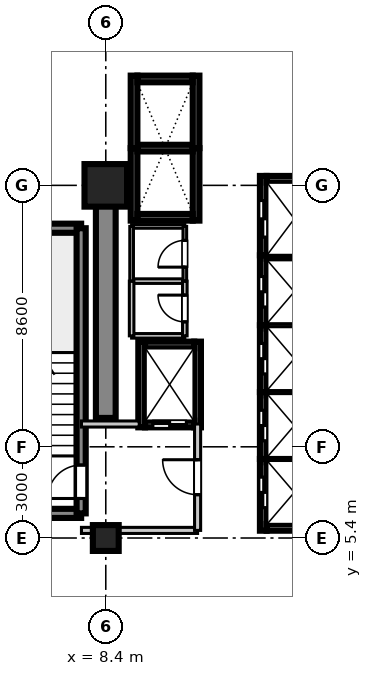
"""IFC4 building model, lengths in metres.
Left out: names, types, materials, properties, quantities, classifications, styles, units other than length and angle.
Written with IfcOpenShell. Run it as: python <this file> out.ifc"""

import sys

from ifc_helpers import new_model, si_unit, direction, frame, frame_2d, origin, origin_2d, place, context, subcontext, project, spatial, rectangle, extrude, source, transform, mapped, element, fill, save


model = new_model("IFC4")
c1 = context("Model", 3, precision=1e-05, world=origin(), true_north=direction((0.0, 1.0)))
c2 = subcontext(c1, "Body", "Model", "MODEL_VIEW")
j1 = project(units=[si_unit("LENGTHUNIT", "METRE"), si_unit("PLANEANGLEUNIT", "RADIAN")], contexts=[c1])
p1 = place(None, origin())
s1 = spatial("IfcSite", under=j1, at=p1, CompositionType="ELEMENT")
p2 = place(p1, origin())
s2 = spatial("IfcBuilding", under=s1, at=p2, CompositionType="ELEMENT")
p3 = place(p2, frame((0.0, 0.0, 61.6)))
s3 = spatial("IfcBuildingStorey", under=s2, at=p3, CompositionType="ELEMENT", Elevation=61.6)
m1 = source(origin(), c2, "Body", "SweptSolid", [
    extrude(rectangle(XDim=0.85, YDim=0.85, at=origin_2d()), origin(), (0.0, 0.0, 1.0), 3.605),
])
p4 = place(p3, frame((8.4, 5.4, 0.0), z_axis=(0.0, 0.0, 1.0), x_axis=(1.0, 0.0, 0.0)))
e1 = element("IfcColumn", 1, at=p4, inside=s3, PredefinedType="PILASTER", context=c2, shape_type="MappedRepresentation", body=[
    mapped(m1, transform((0.0, 0.0, 0.0), scale=1.0)),
])
m2 = source(origin(), c2, "Body", "SweptSolid", [
    extrude(rectangle(XDim=1.4, YDim=1.4, at=origin_2d()), origin(), (0.0, 0.0, 1.0), 3.605),
])
p5 = place(p3, frame((8.4, 17.0, 0.0), z_axis=(0.0, 0.0, 1.0), x_axis=(1.0, 0.0, 0.0)))
e2 = element("IfcColumn", 2, at=p5, inside=s3, PredefinedType="COLUMN", context=c2, shape_type="MappedRepresentation", body=[
    mapped(m2, transform((0.0, 0.0, 0.0), scale=1.0)),
])
m3 = source(origin(), c2, "Body", "SweptSolid", [
    extrude(rectangle(XDim=7.65, YDim=0.65, at=frame_2d((3.825, 0.0))), origin(), (0.0, 0.0, 1.0), 3.37),
])
p6 = place(p3, frame((8.4, 9.35, 0.0), z_axis=(0.0, 0.0, 1.0), x_axis=(0.0, 1.0, 0.0)))
e3 = element("IfcWall", 3, at=p6, inside=s3, PredefinedType="SHEAR", context=c2, shape_type="MappedRepresentation", body=[
    mapped(m3, transform((0.0, 0.0, 0.0), scale=1.0)),
])
m4 = source(origin(), c2, "Body", "SweptSolid", [
    extrude(rectangle(XDim=3.98, YDim=0.3, at=frame_2d((1.99, 0.0))), origin(), (0.0, 0.0, 1.0), 3.37),
])
for number, where, z_axis, x_axis in (
    (4, (3.61, 6.21, 0.0), (0.0, 0.0, 1.0), (1.0, 0.0, 0.0)),
    (5, (3.61, 15.59, 0.0), (0.0, 0.0, 1.0), (1.0, 0.0, 0.0)),
):
    element("IfcWall", number, at=place(p3, frame(where, z_axis=z_axis, x_axis=x_axis)), inside=s3, PredefinedType="SHEAR", context=c2, shape_type="MappedRepresentation", body=[
        mapped(m4, transform((0.0, 0.0, 0.0), scale=1.0)),
    ])
m5 = source(origin(), c2, "Body", "SweptSolid", [
    extrude(rectangle(XDim=9.38, YDim=0.3, at=frame_2d((4.69, 0.0))), origin(), (0.0, 0.0, 1.0), 3.37),
])
p7 = place(p3, frame((7.59, 6.21, 0.0), z_axis=(0.0, 0.0, 1.0), x_axis=(0.0, 1.0, 0.0)))
e6 = element("IfcWall", 6, at=p7, inside=s3, PredefinedType="SHEAR", context=c2, shape_type="MappedRepresentation", body=[
    mapped(m5, transform((0.0, 0.0, 0.0), scale=1.0)),
])
p8 = place(p7, frame((0.49, 0.0, 0.0)))
e7 = element("IfcOpeningElement", 7, at=p8, cuts=e6, PredefinedType="OPENING", context=c2, shape_type="SweptSolid", body=[
    extrude(rectangle(XDim=1.1, YDim=2.15, at=frame_2d((0.55, 1.075))), frame((0.0, 0.16, 0.0), z_axis=(0.0, -1.0, 0.0), x_axis=(1.0, 0.0, 0.0)), (0.0, 0.0, 1.0), 0.32),
])
m6 = source(origin(), c2, "Body", "SweptSolid", [
    extrude(rectangle(XDim=2.36, YDim=0.22, at=frame_2d((1.18, 0.0))), origin(), (0.0, 0.0, 1.0), 3.37),
])
p9 = place(p3, frame((13.58, 5.64, 0.0), z_axis=(0.0, 0.0, 1.0), x_axis=(0.0, 1.0, 0.0)))
e8 = element("IfcWall", 8, at=p9, inside=s3, PredefinedType="SHEAR", context=c2, shape_type="MappedRepresentation", body=[
    mapped(m6, transform((0.0, 0.0, 0.0), scale=1.0)),
])
p10 = place(p9, frame((0.76, 0.0, 0.0)))
e9 = element("IfcOpeningElement", 9, at=p10, cuts=e8, PredefinedType="OPENING", context=c2, shape_type="SweptSolid", body=[
    extrude(rectangle(XDim=1.0, YDim=2.2, at=frame_2d((0.5, 1.1))), frame((0.0, 0.12, 0.0), z_axis=(0.0, -1.0, 0.0), x_axis=(1.0, 0.0, 0.0)), (0.0, 0.0, 1.0), 0.24),
])
m7 = source(origin(), c2, "Body", "SweptSolid", [
    extrude(rectangle(XDim=1.82, YDim=0.22, at=frame_2d((0.91, 0.0))), origin(), (0.0, 0.0, 1.0), 3.37),
])
p11 = place(p3, frame((13.69, 5.75, 0.0), z_axis=(0.0, 0.0, 1.0), x_axis=(1.0, 0.0, 0.0)))
e10 = element("IfcWall", 10, at=p11, inside=s3, PredefinedType="SHEAR", context=c2, shape_type="MappedRepresentation", body=[
    mapped(m7, transform((0.0, 0.0, 0.0), scale=1.0)),
])
m8 = source(origin(), c2, "Body", "SweptSolid", [
    extrude(rectangle(XDim=1.82, YDim=0.22, at=frame_2d((0.91, 0.0))), origin(), (0.0, 0.0, 1.0), 3.65),
])
p12 = place(p3, frame((13.69, 8.0, 0.0), z_axis=(0.0, 0.0, 1.0), x_axis=(1.0, 0.0, 0.0)))
e11 = element("IfcWall", 11, at=p12, inside=s3, PredefinedType="SHEAR", context=c2, shape_type="MappedRepresentation", body=[
    mapped(m8, transform((0.0, 0.0, 0.0), scale=1.0)),
])
m9 = source(origin(), c2, "Body", "SweptSolid", [
    extrude(rectangle(XDim=2.2, YDim=0.22, at=frame_2d((1.1, 0.0))), origin(), (0.0, 0.0, 1.0), 3.37),
])
p13 = place(p3, frame((13.58, 8.0, 0.0), z_axis=(0.0, 0.0, 1.0), x_axis=(0.0, 1.0, 0.0)))
e12 = element("IfcWall", 12, at=p13, inside=s3, PredefinedType="SHEAR", context=c2, shape_type="MappedRepresentation", body=[
    mapped(m9, transform((0.0, 0.0, 0.0), scale=1.0)),
])
p14 = place(p13, frame((0.6, 0.0, 0.0)))
e13 = element("IfcOpeningElement", 13, at=p14, cuts=e12, PredefinedType="OPENING", context=c2, shape_type="SweptSolid", body=[
    extrude(rectangle(XDim=1.0, YDim=2.2, at=frame_2d((0.5, 1.1))), frame((0.0, 0.12, 0.0), z_axis=(0.0, -1.0, 0.0), x_axis=(1.0, 0.0, 0.0)), (0.0, 0.0, 1.0), 0.24),
])
p15 = place(p3, frame((13.69, 10.2, 0.0), z_axis=(0.0, 0.0, 1.0), x_axis=(1.0, 0.0, 0.0)))
e14 = element("IfcWall", 14, at=p15, inside=s3, PredefinedType="SHEAR", context=c2, shape_type="MappedRepresentation", body=[
    mapped(m8, transform((0.0, 0.0, 0.0), scale=1.0)),
])
p16 = place(p3, frame((13.58, 10.2, 0.0), z_axis=(0.0, 0.0, 1.0), x_axis=(0.0, 1.0, 0.0)))
e15 = element("IfcWall", 15, at=p16, inside=s3, PredefinedType="SHEAR", context=c2, shape_type="MappedRepresentation", body=[
    mapped(m9, transform((0.0, 0.0, 0.0), scale=1.0)),
])
p17 = place(p16, frame((0.6, 0.0, 0.0)))
e16 = element("IfcOpeningElement", 16, at=p17, cuts=e15, PredefinedType="OPENING", context=c2, shape_type="SweptSolid", body=[
    extrude(rectangle(XDim=1.0, YDim=2.2, at=frame_2d((0.5, 1.1))), frame((0.0, 0.12, 0.0), z_axis=(0.0, -1.0, 0.0), x_axis=(1.0, 0.0, 0.0)), (0.0, 0.0, 1.0), 0.24),
])
p18 = place(p3, frame((13.69, 12.4, 0.0), z_axis=(0.0, 0.0, 1.0), x_axis=(1.0, 0.0, 0.0)))
e17 = element("IfcWall", 17, at=p18, inside=s3, PredefinedType="SHEAR", context=c2, shape_type="MappedRepresentation", body=[
    mapped(m8, transform((0.0, 0.0, 0.0), scale=1.0)),
])
m10 = source(origin(), c2, "Body", "SweptSolid", [
    extrude(rectangle(XDim=2.3, YDim=0.22, at=frame_2d((1.15, 0.0))), origin(), (0.0, 0.0, 1.0), 3.37),
])
p19 = place(p3, frame((13.58, 12.4, 0.0), z_axis=(0.0, 0.0, 1.0), x_axis=(0.0, 1.0, 0.0)))
e18 = element("IfcWall", 18, at=p19, inside=s3, PredefinedType="SHEAR", context=c2, shape_type="MappedRepresentation", body=[
    mapped(m10, transform((0.0, 0.0, 0.0), scale=1.0)),
])
p20 = place(p19, frame((0.6, 0.0, 0.0)))
e19 = element("IfcOpeningElement", 19, at=p20, cuts=e18, PredefinedType="OPENING", context=c2, shape_type="SweptSolid", body=[
    extrude(rectangle(XDim=1.0, YDim=2.2, at=frame_2d((0.5, 1.1))), frame((0.0, 0.12, 0.0), z_axis=(0.0, -1.0, 0.0), x_axis=(1.0, 0.0, 0.0)), (0.0, 0.0, 1.0), 0.24),
])
p21 = place(p3, frame((13.69, 14.7, 0.0), z_axis=(0.0, 0.0, 1.0), x_axis=(1.0, 0.0, 0.0)))
e20 = element("IfcWall", 20, at=p21, inside=s3, PredefinedType="SHEAR", context=c2, shape_type="MappedRepresentation", body=[
    mapped(m8, transform((0.0, 0.0, 0.0), scale=1.0)),
])
m11 = source(origin(), c2, "Body", "SweptSolid", [
    extrude(rectangle(XDim=2.385, YDim=0.22, at=frame_2d((1.192, 0.0))), origin(), (0.0, 0.0, 1.0), 3.37),
])
for number, where, z_axis, x_axis in (
    (21, (9.33, 15.84, 0.0), (0.0, 0.0, 1.0), (0.0, 1.0, 0.0)),
    (22, (11.37, 15.84, 0.0), (0.0, 0.0, 1.0), (0.0, 1.0, 0.0)),
):
    element("IfcWall", number, at=place(p3, frame(where, z_axis=z_axis, x_axis=x_axis)), inside=s3, PredefinedType="SHEAR", context=c2, shape_type="MappedRepresentation", body=[
        mapped(m11, transform((0.0, 0.0, 0.0), scale=1.0)),
    ])
p22 = place(p3, frame((9.44, 15.95, 0.0), z_axis=(0.0, 0.0, 1.0), x_axis=(1.0, 0.0, 0.0)))
e23 = element("IfcWall", 23, at=p22, inside=s3, PredefinedType="SHEAR", context=c2, shape_type="MappedRepresentation", body=[
    mapped(m7, transform((0.0, 0.0, 0.0), scale=1.0)),
])
p23 = place(p3, frame((9.44, 18.225, 0.0), z_axis=(0.0, 0.0, 1.0), x_axis=(1.0, 0.0, 0.0)))
e24 = element("IfcWall", 24, at=p23, inside=s3, PredefinedType="SHEAR", context=c2, shape_type="MappedRepresentation", body=[
    mapped(m8, transform((0.0, 0.0, 0.0), scale=1.0)),
])
for number, where, z_axis, x_axis in (
    (25, (9.33, 18.225, 0.0), (0.0, 0.0, 1.0), (0.0, 1.0, 0.0)),
    (26, (11.37, 18.225, 0.0), (0.0, 0.0, 1.0), (0.0, 1.0, 0.0)),
):
    element("IfcWall", number, at=place(p3, frame(where, z_axis=z_axis, x_axis=x_axis)), inside=s3, PredefinedType="SHEAR", context=c2, shape_type="MappedRepresentation", body=[
        mapped(m11, transform((0.0, 0.0, 0.0), scale=1.0)),
    ])
p24 = place(p3, frame((9.44, 20.5, 0.0), z_axis=(0.0, 0.0, 1.0), x_axis=(1.0, 0.0, 0.0)))
e27 = element("IfcWall", 27, at=p24, inside=s3, PredefinedType="SHEAR", context=c2, shape_type="MappedRepresentation", body=[
    mapped(m7, transform((0.0, 0.0, 0.0), scale=1.0)),
])
m12 = source(origin(), c2, "Body", "SweptSolid", [
    extrude(rectangle(XDim=2.82, YDim=0.22, at=frame_2d((1.41, 0.0))), origin(), (0.0, 0.0, 1.0), 3.37),
])
for number, where, z_axis, x_axis in (
    (28, (9.58, 9.04, 0.0), (0.0, 0.0, 1.0), (0.0, 1.0, 0.0)),
    (29, (11.42, 9.04, 0.0), (0.0, 0.0, 1.0), (0.0, 1.0, 0.0)),
):
    element("IfcWall", number, at=place(p3, frame(where, z_axis=z_axis, x_axis=x_axis)), inside=s3, PredefinedType="SHEAR", context=c2, shape_type="MappedRepresentation", body=[
        mapped(m12, transform((0.0, 0.0, 0.0), scale=1.0)),
    ])
m13 = source(origin(), c2, "Body", "SweptSolid", [
    extrude(rectangle(XDim=1.62, YDim=0.22, at=frame_2d((0.81, 0.0))), origin(), (0.0, 0.0, 1.0), 3.37),
])
p25 = place(p3, frame((9.69, 9.15, 0.0), z_axis=(0.0, 0.0, 1.0), x_axis=(1.0, 0.0, 0.0)))
e30 = element("IfcWall", 30, at=p25, inside=s3, PredefinedType="SHEAR", context=c2, shape_type="MappedRepresentation", body=[
    mapped(m13, transform((0.0, 0.0, 0.0), scale=1.0)),
])
p26 = place(p25, frame((0.26, 0.0, 0.0)))
e31 = element("IfcOpeningElement", 31, at=p26, cuts=e30, PredefinedType="OPENING", context=c2, shape_type="SweptSolid", body=[
    extrude(rectangle(XDim=1.1, YDim=2.2, at=frame_2d((0.55, 1.1))), frame((0.0, 0.12, 0.0), z_axis=(0.0, -1.0, 0.0), x_axis=(1.0, 0.0, 0.0)), (0.0, 0.0, 1.0), 0.24),
])
p27 = place(p3, frame((9.69, 11.75, 0.0), z_axis=(0.0, 0.0, 1.0), x_axis=(1.0, 0.0, 0.0)))
e32 = element("IfcWall", 32, at=p27, inside=s3, PredefinedType="SHEAR", context=c2, shape_type="MappedRepresentation", body=[
    mapped(m13, transform((0.0, 0.0, 0.0), scale=1.0)),
])
m14 = source(origin(), c2, "Body", "SweptSolid", [
    extrude(rectangle(XDim=2.61, YDim=0.22, at=frame_2d((1.305, 0.0))), origin(), (0.0, 0.0, 1.0), 3.37),
])
p28 = place(p3, frame((13.58, 14.7, 0.0), z_axis=(0.0, 0.0, 1.0), x_axis=(0.0, 1.0, 0.0)))
e33 = element("IfcWall", 33, at=p28, inside=s3, PredefinedType="SHEAR", context=c2, shape_type="MappedRepresentation", body=[
    mapped(m14, transform((0.0, 0.0, 0.0), scale=1.0)),
])
p29 = place(p28, frame((0.6, 0.0, 0.0)))
e34 = element("IfcOpeningElement", 34, at=p29, cuts=e33, PredefinedType="OPENING", context=c2, shape_type="SweptSolid", body=[
    extrude(rectangle(XDim=1.2, YDim=2.2, at=frame_2d((0.6, 1.1))), frame((0.0, 0.12, 0.0), z_axis=(0.0, -1.0, 0.0), x_axis=(1.0, 0.0, 0.0)), (0.0, 0.0, 1.0), 0.24),
])
p30 = place(p3, frame((13.69, 17.2, 0.0), z_axis=(0.0, 0.0, 1.0), x_axis=(1.0, 0.0, 0.0)))
e35 = element("IfcWall", 35, at=p30, inside=s3, PredefinedType="SHEAR", context=c2, shape_type="MappedRepresentation", body=[
    mapped(m7, transform((0.0, 0.0, 0.0), scale=1.0)),
])
m15 = source(origin(), c2, "Body", "SweptSolid", [
    extrude(rectangle(XDim=3.82, YDim=0.2, at=frame_2d((1.91, 0.0))), origin(), (0.0, 0.0, 1.0), 2.71),
])
p31 = place(p3, frame((7.6, 5.65, 0.0), z_axis=(0.0, 0.0, 1.0), x_axis=(1.0, 0.0, 0.0)))
e36 = element("IfcWall", 36, at=p31, inside=s3, PredefinedType="PARTITIONING", context=c2, shape_type="MappedRepresentation", body=[
    mapped(m15, transform((0.0, 0.0, 0.0), scale=1.0)),
])
m16 = source(origin(), c2, "Body", "SweptSolid", [
    extrude(rectangle(XDim=1.9, YDim=0.2, at=frame_2d((0.95, 0.0))), origin(), (0.0, 0.0, 1.0), 2.71),
])
p32 = place(p3, frame((7.6, 9.15, 0.0), z_axis=(0.0, 0.0, 1.0), x_axis=(1.0, 0.0, 0.0)))
e37 = element("IfcWall", 37, at=p32, inside=s3, PredefinedType="PARTITIONING", context=c2, shape_type="MappedRepresentation", body=[
    mapped(m16, transform((0.0, 0.0, 0.0), scale=1.0)),
])
m17 = source(origin(), c2, "Body", "SweptSolid", [
    extrude(rectangle(XDim=3.5, YDim=0.2, at=frame_2d((1.75, 0.0))), origin(), (0.0, 0.0, 1.0), 2.71),
])
p33 = place(p3, frame((11.42, 5.65, 0.0), z_axis=(0.0, 0.0, 1.0), x_axis=(0.0, 1.0, 0.0)))
e38 = element("IfcWall", 38, at=p33, inside=s3, PredefinedType="PARTITIONING", context=c2, shape_type="MappedRepresentation", body=[
    mapped(m17, transform((0.0, 0.0, 0.0), scale=1.0)),
])
p34 = place(p33, frame((1.175, 0.0, 0.0)))
e39 = element("IfcOpeningElement", 39, at=p34, cuts=e38, PredefinedType="OPENING", context=c2, shape_type="SweptSolid", body=[
    extrude(rectangle(XDim=1.15, YDim=2.15, at=frame_2d((0.575, 1.075))), frame((0.0, 0.11, 0.0), z_axis=(0.0, -1.0, 0.0), x_axis=(1.0, 0.0, 0.0)), (0.0, 0.0, 1.0), 0.22),
])
m18 = source(origin(), c2, "Body", "SweptSolid", [
    extrude(rectangle(XDim=1.75, YDim=0.15, at=frame_2d((0.875, 0.0))), origin(), (0.0, 0.0, 1.0), 2.71),
])
for number, where, z_axis, x_axis in (
    (40, (9.25, 12.05, 0.0), (0.0, 0.0, 1.0), (1.0, 0.0, 0.0)),
    (41, (9.25, 13.85, 0.0), (0.0, 0.0, 1.0), (1.0, 0.0, 0.0)),
):
    element("IfcWall", number, at=place(p3, frame(where, z_axis=z_axis, x_axis=x_axis)), inside=s3, PredefinedType="PARTITIONING", context=c2, shape_type="MappedRepresentation", body=[
        mapped(m18, transform((0.0, 0.0, 0.0), scale=1.0)),
    ])
m19 = source(origin(), c2, "Body", "SweptSolid", [
    extrude(rectangle(XDim=1.8, YDim=0.15, at=frame_2d((0.9, 0.0))), origin(), (0.0, 0.0, 1.0), 2.71),
])
p35 = place(p3, frame((9.25, 12.05, 0.0), z_axis=(0.0, 0.0, 1.0), x_axis=(0.0, 1.0, 0.0)))
e42 = element("IfcWall", 42, at=p35, inside=s3, PredefinedType="PARTITIONING", context=c2, shape_type="MappedRepresentation", body=[
    mapped(m19, transform((0.0, 0.0, 0.0), scale=1.0)),
])
p36 = place(p3, frame((11.0, 12.05, 0.0), z_axis=(0.0, 0.0, 1.0), x_axis=(0.0, 1.0, 0.0)))
e43 = element("IfcWall", 43, at=p36, inside=s3, PredefinedType="PARTITIONING", context=c2, shape_type="MappedRepresentation", body=[
    mapped(m19, transform((0.0, 0.0, 0.0), scale=1.0)),
])
p37 = place(p36, frame((0.46, 0.0, 0.0)))
e44 = element("IfcOpeningElement", 44, at=p37, cuts=e43, PredefinedType="OPENING", context=c2, shape_type="SweptSolid", body=[
    extrude(rectangle(XDim=0.88, YDim=2.1, at=frame_2d((0.44, 1.05))), frame((0.0, 0.085, 0.0), z_axis=(0.0, -1.0, 0.0), x_axis=(1.0, 0.0, 0.0)), (0.0, 0.0, 1.0), 0.17),
])
m20 = source(origin(), c2, "Body", "SweptSolid", [
    extrude(rectangle(XDim=1.75, YDim=0.12, at=frame_2d((0.875, 0.0))), origin(), (0.0, 0.0, 1.0), 2.71),
])
p38 = place(p3, frame((9.25, 15.65, 0.0), z_axis=(0.0, 0.0, 1.0), x_axis=(1.0, 0.0, 0.0)))
e45 = element("IfcWall", 45, at=p38, inside=s3, PredefinedType="PARTITIONING", context=c2, shape_type="MappedRepresentation", body=[
    mapped(m20, transform((0.0, 0.0, 0.0), scale=1.0)),
])
m21 = source(origin(), c2, "Body", "SweptSolid", [
    extrude(rectangle(XDim=1.8, YDim=0.12, at=frame_2d((0.9, 0.0))), origin(), (0.0, 0.0, 1.0), 2.71),
])
p39 = place(p3, frame((9.25, 13.85, 0.0), z_axis=(0.0, 0.0, 1.0), x_axis=(0.0, 1.0, 0.0)))
e46 = element("IfcWall", 46, at=p39, inside=s3, PredefinedType="PARTITIONING", context=c2, shape_type="MappedRepresentation", body=[
    mapped(m21, transform((0.0, 0.0, 0.0), scale=1.0)),
])
p40 = place(p3, frame((11.0, 13.85, 0.0), z_axis=(0.0, 0.0, 1.0), x_axis=(0.0, 1.0, 0.0)))
e47 = element("IfcWall", 47, at=p40, inside=s3, PredefinedType="PARTITIONING", context=c2, shape_type="MappedRepresentation", body=[
    mapped(m21, transform((0.0, 0.0, 0.0), scale=1.0)),
])
p41 = place(p40, frame((0.46, 0.0, 0.0)))
e48 = element("IfcOpeningElement", 48, at=p41, cuts=e47, PredefinedType="OPENING", context=c2, shape_type="SweptSolid", body=[
    extrude(rectangle(XDim=0.88, YDim=2.1, at=frame_2d((0.44, 1.05))), frame((0.0, 0.07, 0.0), z_axis=(0.0, -1.0, 0.0), x_axis=(1.0, 0.0, 0.0)), (0.0, 0.0, 1.0), 0.14),
])
m22 = source(origin(), c2, "Body", "SweptSolid", [
    extrude(rectangle(XDim=1.1, YDim=2.15, at=frame_2d((0.55, 1.075))), frame((0.0, 0.025, 0.0), z_axis=(0.0, -1.0, 0.0), x_axis=(1.0, 0.0, 0.0)), (0.0, 0.0, 1.0), 0.05),
])
p42 = place(p8, origin())
e49 = element("IfcDoor", 49, at=p42, inside=s3, OperationType="SINGLE_SWING_LEFT", PredefinedType="DOOR", context=c2, shape_type="MappedRepresentation", body=[
    mapped(m22, transform((0.0, 0.0, 0.0), scale=1.0)),
])
fill(e7, e49)
m23 = source(origin(), c2, "Body", "SweptSolid", [
    extrude(rectangle(XDim=1.0, YDim=2.2, at=frame_2d((0.5, 1.1))), frame((0.0, 0.025, 0.0), z_axis=(0.0, -1.0, 0.0), x_axis=(1.0, 0.0, 0.0)), (0.0, 0.0, 1.0), 0.05),
])
p43 = place(p10, origin())
e50 = element("IfcDoor", 50, at=p43, inside=s3, OperationType="DOUBLE_DOOR_SLIDING", PredefinedType="DOOR", context=c2, shape_type="MappedRepresentation", body=[
    mapped(m23, transform((0.0, 0.0, 0.0), scale=1.0)),
])
fill(e9, e50)
p44 = place(p14, origin())
e51 = element("IfcDoor", 51, at=p44, inside=s3, OperationType="DOUBLE_DOOR_SLIDING", PredefinedType="DOOR", context=c2, shape_type="MappedRepresentation", body=[
    mapped(m23, transform((0.0, 0.0, 0.0), scale=1.0)),
])
fill(e13, e51)
p45 = place(p17, origin())
e52 = element("IfcDoor", 52, at=p45, inside=s3, OperationType="DOUBLE_DOOR_SLIDING", PredefinedType="DOOR", context=c2, shape_type="MappedRepresentation", body=[
    mapped(m23, transform((0.0, 0.0, 0.0), scale=1.0)),
])
fill(e16, e52)
p46 = place(p20, origin())
e53 = element("IfcDoor", 53, at=p46, inside=s3, OperationType="DOUBLE_DOOR_SLIDING", PredefinedType="DOOR", context=c2, shape_type="MappedRepresentation", body=[
    mapped(m23, transform((0.0, 0.0, 0.0), scale=1.0)),
])
fill(e19, e53)
m24 = source(origin(), c2, "Body", "SweptSolid", [
    extrude(rectangle(XDim=1.1, YDim=2.2, at=frame_2d((0.55, 1.1))), frame((0.0, 0.025, 0.0), z_axis=(0.0, -1.0, 0.0), x_axis=(1.0, 0.0, 0.0)), (0.0, 0.0, 1.0), 0.05),
])
p47 = place(p26, frame((1.1, 0.0, 0.0), z_axis=(0.0, 0.0, 1.0), x_axis=(-1.0, 0.0, 0.0)))
e54 = element("IfcDoor", 54, at=p47, inside=s3, OperationType="DOUBLE_DOOR_SLIDING", PredefinedType="DOOR", context=c2, shape_type="MappedRepresentation", body=[
    mapped(m24, transform((0.0, 0.0, 0.0), scale=1.0)),
])
fill(e31, e54)
m25 = source(origin(), c2, "Body", "SweptSolid", [
    extrude(rectangle(XDim=1.2, YDim=2.2, at=frame_2d((0.6, 1.1))), frame((0.0, 0.025, 0.0), z_axis=(0.0, -1.0, 0.0), x_axis=(1.0, 0.0, 0.0)), (0.0, 0.0, 1.0), 0.05),
])
p48 = place(p29, origin())
e55 = element("IfcDoor", 55, at=p48, inside=s3, OperationType="DOUBLE_DOOR_SLIDING", PredefinedType="DOOR", context=c2, shape_type="MappedRepresentation", body=[
    mapped(m25, transform((0.0, 0.0, 0.0), scale=1.0)),
])
fill(e34, e55)
m26 = source(origin(), c2, "Body", "SweptSolid", [
    extrude(rectangle(XDim=1.15, YDim=2.15, at=frame_2d((0.575, 1.075))), frame((0.0, 0.025, 0.0), z_axis=(0.0, -1.0, 0.0), x_axis=(1.0, 0.0, 0.0)), (0.0, 0.0, 1.0), 0.05),
])
p49 = place(p34, frame((1.15, 0.0, 0.0), z_axis=(0.0, 0.0, 1.0), x_axis=(-1.0, 0.0, 0.0)))
e56 = element("IfcDoor", 56, at=p49, inside=s3, OperationType="SINGLE_SWING_RIGHT", PredefinedType="DOOR", context=c2, shape_type="MappedRepresentation", body=[
    mapped(m26, transform((0.0, 0.0, 0.0), scale=1.0)),
])
fill(e39, e56)
m27 = source(origin(), c2, "Body", "SweptSolid", [
    extrude(rectangle(XDim=0.88, YDim=2.1, at=frame_2d((0.44, 1.05))), frame((0.0, 0.025, 0.0), z_axis=(0.0, -1.0, 0.0), x_axis=(1.0, 0.0, 0.0)), (0.0, 0.0, 1.0), 0.05),
])
p50 = place(p37, origin())
e57 = element("IfcDoor", 57, at=p50, inside=s3, OperationType="SINGLE_SWING_RIGHT", PredefinedType="DOOR", context=c2, shape_type="MappedRepresentation", body=[
    mapped(m27, transform((0.0, 0.0, 0.0), scale=1.0)),
])
fill(e44, e57)
p51 = place(p41, origin())
e58 = element("IfcDoor", 58, at=p51, inside=s3, OperationType="SINGLE_SWING_LEFT", PredefinedType="DOOR", context=c2, shape_type="MappedRepresentation", body=[
    mapped(m27, transform((0.0, 0.0, 0.0), scale=1.0)),
])
fill(e48, e58)
save(model, sys.argv[1])
